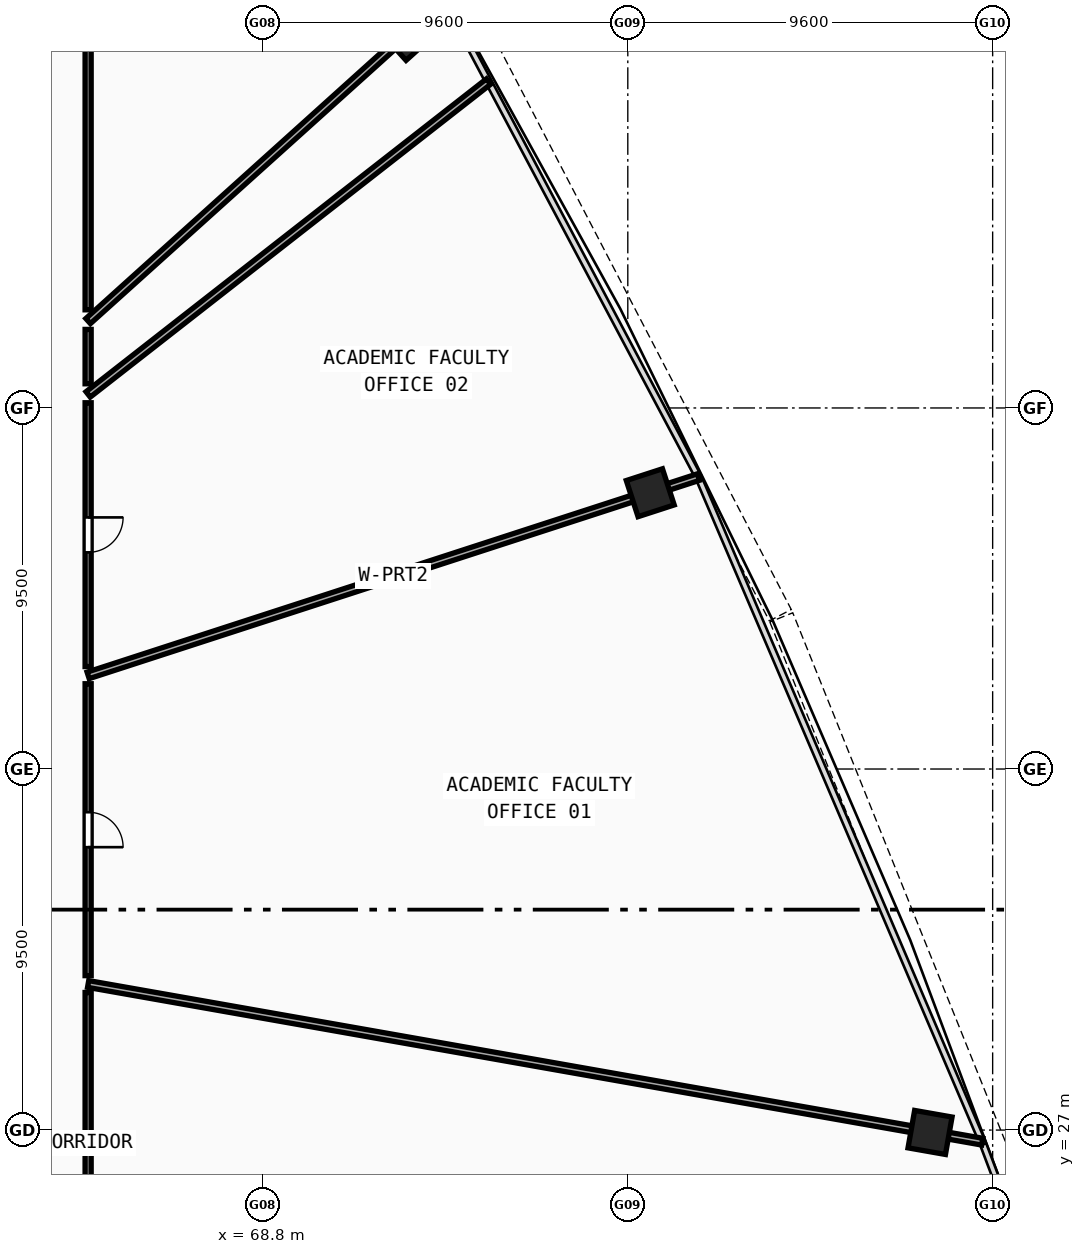
"""IFC4 building model, lengths in metres.
Left out: names, types, materials, properties, quantities, classifications, styles, units other than length and angle.
Written with IfcOpenShell. Run it as: python <this file> out.ifc"""

import sys

from ifc_helpers import new_model, si_unit, direction, frame, frame_2d, origin, origin_with_axes, origin_2d, place, context, subcontext, project, spatial, rectangle, hollow_rectangle, extrude, source, transform, mapped, element, fill, save


model = new_model("IFC4")
c1 = context("Model", 3, precision=1e-05, world=origin(), true_north=direction((0.0, 1.0)))
c2 = subcontext(c1, "Body", "Model", "MODEL_VIEW")
j1 = project(units=[si_unit("LENGTHUNIT", "METRE"), si_unit("PLANEANGLEUNIT", "RADIAN")], contexts=[c1])
p1 = place(None, origin())
s1 = spatial("IfcSite", under=j1, at=p1, CompositionType="ELEMENT")
p2 = place(p1, origin())
s2 = spatial("IfcBuilding", under=s1, at=p2, CompositionType="ELEMENT")
p3 = place(p2, frame((0.0, 0.0, 115.38)))
s3 = spatial("IfcBuildingStorey", under=s2, at=p3, CompositionType="ELEMENT", Elevation=115.38)
m1 = source(origin(), c2, "Body", "SweptSolid", [
    extrude(hollow_rectangle(XDim=1.0, YDim=1.0, WallThickness=0.042, at=origin_2d()), origin(), (0.0, 0.0, 1.0), 3.78),
])
for number, where, z_axis, x_axis in (
    (1, (86.353, 26.938, -0.26), (0.0, 0.0, 1.0), (0.174, 0.985, 0.0)),
    (2, (78.991, 43.77, -0.26), (0.0, 0.0, 1.0), (-0.309, 0.951, 0.0)),
    (3, (72.603, 55.852, -0.26), (0.0, 0.0, 1.0), (-0.669, 0.743, 0.0)),
):
    element("IfcColumn", number, at=place(p3, frame(where, z_axis=z_axis, x_axis=x_axis)), inside=s3, PredefinedType="COLUMN", context=c2, shape_type="MappedRepresentation", body=[
        mapped(m1, transform((0.0, 0.0, 0.0), scale=1.0)),
    ])
p4 = place(p3, frame((64.2, 38.964, 0.0), z_axis=(0.0, 0.0, 1.0), x_axis=(0.951054786835, 0.309022317054, 0.0)))
e4 = element("IfcWall", 4, at=p4, inside=s3, PredefinedType="PARTITIONING", context=c2, shape_type="SweptSolid", body=[
    extrude(rectangle(XDim=16.885, YDim=0.18, at=frame_2d((8.442, 0.0))), origin(), (0.0, 0.0, 1.0), 2.82),
])
p5 = place(p3, frame((64.2, 46.357, 0.0), z_axis=(0.0, 0.0, 1.0), x_axis=(0.788007209352, 0.615666011738, 0.0)))
e5 = element("IfcWall", 5, at=p5, inside=s3, PredefinedType="PARTITIONING", context=c2, shape_type="SweptSolid", body=[
    extrude(rectangle(XDim=13.37, YDim=0.18, at=frame_2d((6.685, 0.0))), origin(), (0.0, 0.0, 1.0), 2.82),
])
p6 = place(p3, frame((64.2, 48.287, 0.0), z_axis=(0.0, 0.0, 1.0), x_axis=(0.743140441227, 0.66913547553, 0.0)))
e6 = element("IfcWall", 6, at=p6, inside=s3, PredefinedType="PARTITIONING", context=c2, shape_type="SweptSolid", body=[
    extrude(rectangle(XDim=12.638, YDim=0.18, at=frame_2d((6.319, 0.0))), origin(), (0.0, 0.0, 1.0), 2.82),
])
p7 = place(p3, frame((64.2, 30.844, 0.0), z_axis=(0.0, 0.0, 1.0), x_axis=(0.98480783024, -0.173647739683, 0.0)))
e7 = element("IfcWall", 7, at=p7, inside=s3, PredefinedType="PARTITIONING", context=c2, shape_type="SweptSolid", body=[
    extrude(rectangle(XDim=23.889, YDim=0.18, at=frame_2d((11.944, 0.0))), origin(), (0.0, 0.0, 1.0), 2.82),
])
p8 = place(p3, frame((64.2, 55.8, 0.0), z_axis=(0.0, 0.0, 1.0), x_axis=(0.0, -1.0, 0.0)))
e8 = element("IfcWall", 8, at=p8, inside=s3, PredefinedType="PARTITIONING", context=c2, shape_type="SweptSolid", body=[
    extrude(rectangle(XDim=7.218, YDim=0.16, at=frame_2d((3.609, 0.0))), origin(), (0.0, 0.0, 1.0), 3.12),
])
p9 = place(p3, frame((64.2, 48.067, 0.0), z_axis=(0.0, 0.0, 1.0), x_axis=(0.0, -1.0, 0.0)))
e9 = element("IfcWall", 9, at=p9, inside=s3, PredefinedType="PARTITIONING", context=c2, shape_type="SweptSolid", body=[
    extrude(rectangle(XDim=1.431, YDim=0.16, at=frame_2d((0.715, 0.0))), origin(), (0.0, 0.0, 1.0), 2.82),
])
p10 = place(p3, frame((64.2, 46.137, 0.0), z_axis=(0.0, 0.0, 1.0), x_axis=(0.0, -1.0, 0.0)))
e10 = element("IfcWall", 10, at=p10, inside=s3, PredefinedType="PARTITIONING", context=c2, shape_type="SweptSolid", body=[
    extrude(rectangle(XDim=6.942, YDim=0.16, at=frame_2d((3.471, 0.0))), origin(), (0.0, 0.0, 1.0), 3.12),
])
p11 = place(p10, frame((3.017, 0.0, 0.0)))
e11 = element("IfcOpeningElement", 11, at=p11, cuts=e10, PredefinedType="OPENING", context=c2, shape_type="SweptSolid", body=[
    extrude(rectangle(XDim=0.92, YDim=2.1, at=frame_2d((0.46, 1.05))), frame((0.0, 0.09, 0.0), z_axis=(0.0, -1.0, 0.0), x_axis=(1.0, 0.0, 0.0)), (0.0, 0.0, 1.0), 0.18),
])
p12 = place(p3, frame((64.2, 38.744, 0.0), z_axis=(0.0, 0.0, 1.0), x_axis=(0.0, -1.0, 0.0)))
e12 = element("IfcWall", 12, at=p12, inside=s3, PredefinedType="PARTITIONING", context=c2, shape_type="SweptSolid", body=[
    extrude(rectangle(XDim=7.681, YDim=0.16, at=frame_2d((3.84, 0.0))), origin(), (0.0, 0.0, 1.0), 3.52),
])
p13 = place(p12, frame((3.38, 0.0, 0.0)))
e13 = element("IfcOpeningElement", 13, at=p13, cuts=e12, PredefinedType="OPENING", context=c2, shape_type="SweptSolid", body=[
    extrude(rectangle(XDim=0.92, YDim=2.1, at=frame_2d((0.46, 1.05))), frame((0.0, 0.09, 0.0), z_axis=(0.0, -1.0, 0.0), x_axis=(1.0, 0.0, 0.0)), (0.0, 0.0, 1.0), 0.18),
])
p14 = place(p3, frame((64.2, 30.62, 0.0), z_axis=(0.0, 0.0, 1.0), x_axis=(0.0, -1.0, 0.0)))
e14 = element("IfcWall", 14, at=p14, inside=s3, PredefinedType="PARTITIONING", context=c2, shape_type="SweptSolid", body=[
    extrude(rectangle(XDim=5.82, YDim=0.16, at=frame_2d((2.91, 0.0))), origin(), (0.0, 0.0, 1.0), 3.12),
])
m2 = source(origin(), c2, "Body", "SweptSolid", [
    extrude(rectangle(XDim=0.92, YDim=2.1, at=frame_2d((0.46, 1.05))), frame((0.0, 0.025, 0.0), z_axis=(0.0, -1.0, 0.0), x_axis=(1.0, 0.0, 0.0)), (0.0, 0.0, 1.0), 0.05),
])
p15 = place(p13, origin_with_axes())
e15 = element("IfcDoor", 15, at=p15, inside=s3, OperationType="SINGLE_SWING_RIGHT", PredefinedType="DOOR", context=c2, shape_type="MappedRepresentation", body=[
    mapped(m2, transform((0.0, 0.0, 0.0), scale=1.0)),
])
fill(e13, e15)
p16 = place(p11, origin_with_axes())
e16 = element("IfcDoor", 16, at=p16, inside=s3, OperationType="SINGLE_SWING_LEFT", PredefinedType="DOOR", context=c2, shape_type="MappedRepresentation", body=[
    mapped(m2, transform((0.0, 0.0, 0.0), scale=1.0)),
])
fill(e11, e16)
save(model, sys.argv[1])
